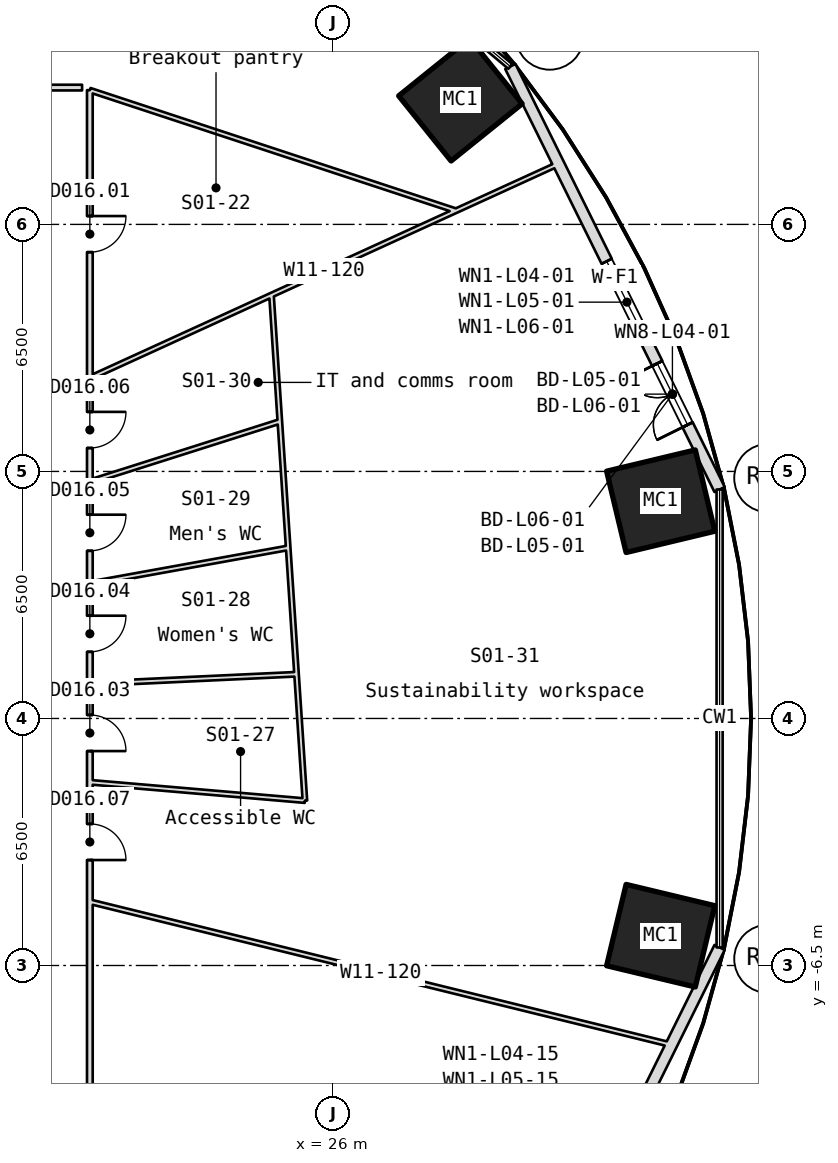
"""IFC4 building model, lengths in metres.
Left out: names, types, materials, properties, quantities, classifications, styles, units other than length and angle.
Written with IfcOpenShell. Run it as: python <this file> out.ifc"""

import sys

from ifc_helpers import new_model, si_unit, direction, frame, frame_2d, origin, origin_2d, place, context, subcontext, project, spatial, rectangle, hollow_rectangle, extrude, element, fill, save


model = new_model("IFC4")
c1 = context("Model", 3, precision=1e-05, world=origin(), true_north=direction((0.0, 1.0)))
c2 = subcontext(c1, "Body", "Model", "MODEL_VIEW")
j1 = project(units=[si_unit("LENGTHUNIT", "METRE"), si_unit("PLANEANGLEUNIT", "RADIAN")], contexts=[c1])
p1 = place(None, origin())
s1 = spatial("IfcSite", under=j1, at=p1, CompositionType="ELEMENT")
p2 = place(p1, origin())
s2 = spatial("IfcBuilding", under=s1, at=p2, CompositionType="ELEMENT")
p3 = place(p2, frame((0.0, 0.0, 33.0)))
s3 = spatial("IfcBuildingStorey", under=s2, at=p3, CompositionType="ELEMENT", Elevation=33.0)
for number, where, z_axis, x_axis in (
    (1, (34.622, 5.716, -0.18), (0.0, 0.0, 1.0), (0.233, -0.972, 0.0)),
    (2, (29.351, 16.278, -0.18), (0.0, 0.0, 1.0), (0.627, -0.779, 0.0)),
    (3, (34.622, -5.716, -0.18), (0.0, 0.0, 1.0), (-0.233, -0.972, 0.0)),
):
    element("IfcColumn", number, at=place(p3, frame(where, z_axis=z_axis, x_axis=x_axis)), inside=s3, PredefinedType="COLUMN", context=c2, shape_type="SweptSolid", body=[
        extrude(hollow_rectangle(XDim=2.2, YDim=2.4, WallThickness=0.09, at=origin_2d()), origin(), (0.0, 0.0, 1.0), 4.15),
    ])
p4 = place(p3, frame((36.171, 6.024, 0.0), z_axis=(0.0, 0.0, 1.0), x_axis=(-0.443411588907, 0.896318114747, 0.0)))
e4 = element("IfcWall", 4, at=p4, inside=s3, PredefinedType="SOLIDWALL", context=c2, shape_type="SweptSolid", body=[
    extrude(rectangle(XDim=12.419, YDim=0.3, at=frame_2d((6.209, 0.0))), origin(), (0.0, 0.0, 1.0), 3.97),
])
p5 = place(p4, frame((1.9, 0.0, 0.0)))
e5 = element("IfcOpeningElement", 5, at=p5, cuts=e4, PredefinedType="OPENING", context=c2, shape_type="SweptSolid", body=[
    extrude(rectangle(XDim=1.8, YDim=2.4, at=frame_2d((0.9, 1.2))), frame((0.0, 0.16, 0.0), z_axis=(0.0, -1.0, 0.0), x_axis=(1.0, 0.0, 0.0)), (0.0, 0.0, 1.0), 0.32),
])
p6 = place(p4, frame((4.3, 0.0, 0.9)))
e6 = element("IfcOpeningElement", 6, at=p6, cuts=e4, PredefinedType="OPENING", context=c2, shape_type="SweptSolid", body=[
    extrude(rectangle(XDim=2.4, YDim=1.5, at=frame_2d((1.2, 0.75))), frame((0.0, 0.16, 0.0), z_axis=(0.0, -1.0, 0.0), x_axis=(1.0, 0.0, 0.0)), (0.0, 0.0, 1.0), 0.32),
])
p7 = place(p3, frame((30.665, -17.156, 0.0), z_axis=(0.0, 0.0, 1.0), x_axis=(0.443411588907, 0.896318114747, 0.0)))
e7 = element("IfcWall", 7, at=p7, inside=s3, PredefinedType="SOLIDWALL", context=c2, shape_type="SweptSolid", body=[
    extrude(rectangle(XDim=12.419, YDim=0.3, at=frame_2d((6.209, 0.0))), origin(), (0.0, 0.0, 1.0), 3.97),
])
p8 = place(p7, frame((1.9, 0.0, 0.0)))
e8 = element("IfcOpeningElement", 8, at=p8, cuts=e7, PredefinedType="OPENING", context=c2, shape_type="SweptSolid", body=[
    extrude(rectangle(XDim=1.8, YDim=2.4, at=frame_2d((0.9, 1.2))), frame((0.0, 0.16, 0.0), z_axis=(0.0, -1.0, 0.0), x_axis=(1.0, 0.0, 0.0)), (0.0, 0.0, 1.0), 0.32),
])
p9 = place(p7, frame((4.3, 0.0, 0.9)))
e9 = element("IfcOpeningElement", 9, at=p9, cuts=e7, PredefinedType="OPENING", context=c2, shape_type="SweptSolid", body=[
    extrude(rectangle(XDim=2.4, YDim=1.5, at=frame_2d((1.2, 0.75))), frame((0.0, 0.16, 0.0), z_axis=(0.0, -1.0, 0.0), x_axis=(1.0, 0.0, 0.0)), (0.0, 0.0, 1.0), 0.32),
])
p10 = place(p3, frame((-19.6, 16.6, 0.0), z_axis=(0.0, 0.0, 1.0), x_axis=(1.0, 0.0, 0.0)))
e10 = element("IfcWall", 10, at=p10, inside=s3, PredefinedType="PARTITIONING", context=c2, shape_type="SweptSolid", body=[
    extrude(rectangle(XDim=38.996, YDim=0.15, at=frame_2d((19.498, 0.0))), origin(), (0.0, 0.0, 1.0), 3.97),
])
p11 = place(p10, frame((19.857, 0.0, 0.0)))
e11 = element("IfcOpeningElement", 11, at=p11, cuts=e10, PredefinedType="OPENING", context=c2, shape_type="SweptSolid", body=[
    extrude(rectangle(XDim=1.8, YDim=2.1, at=frame_2d((0.9, 1.05))), frame((0.0, 0.085, 0.0), z_axis=(0.0, -1.0, 0.0), x_axis=(1.0, 0.0, 0.0)), (0.0, 0.0, 1.0), 0.17),
])
p12 = place(p10, frame((5.757, 0.0, 0.0)))
e12 = element("IfcOpeningElement", 12, at=p12, cuts=e10, PredefinedType="OPENING", context=c2, shape_type="SweptSolid", body=[
    extrude(rectangle(XDim=1.8, YDim=2.1, at=frame_2d((0.9, 1.05))), frame((0.0, 0.085, 0.0), z_axis=(0.0, -1.0, 0.0), x_axis=(1.0, 0.0, 0.0)), (0.0, 0.0, 1.0), 0.17),
])
p13 = place(p3, frame((19.6, -4.822, 0.0), z_axis=(0.0, 0.0, 1.0), x_axis=(0.971041534545, -0.238910732678, 0.0)))
e13 = element("IfcWall", 13, at=p13, inside=s3, PredefinedType="PARTITIONING", context=c2, shape_type="SweptSolid", body=[
    extrude(rectangle(XDim=15.76, YDim=0.12, at=frame_2d((7.88, 0.0))), origin(), (0.0, 0.0, 1.0), 3.97),
])
p14 = place(p3, frame((19.6, 8.957, 0.0), z_axis=(0.0, 0.0, 1.0), x_axis=(0.909522905178, 0.415653804213, 0.0)))
e14 = element("IfcWall", 14, at=p14, inside=s3, PredefinedType="PARTITIONING", context=c2, shape_type="SweptSolid", body=[
    extrude(rectangle(XDim=13.559, YDim=0.12, at=frame_2d((6.78, 0.0))), origin(), (0.0, 0.0, 1.0), 3.97),
])
p15 = place(p3, frame((19.6, 16.533, 0.0), z_axis=(0.0, 0.0, 1.0), x_axis=(0.0, -1.0, 0.0)))
e15 = element("IfcWall", 15, at=p15, inside=s3, PredefinedType="PARTITIONING", context=c2, shape_type="SweptSolid", body=[
    extrude(rectangle(XDim=33.133, YDim=0.15, at=frame_2d((16.566, 0.0))), origin(), (0.0, 0.0, 1.0), 3.97),
])
p16 = place(p15, frame((3.313, 0.0, 0.0)))
e16 = element("IfcOpeningElement", 16, at=p16, cuts=e15, PredefinedType="OPENING", context=c2, shape_type="SweptSolid", body=[
    extrude(rectangle(XDim=0.95, YDim=2.1, at=frame_2d((0.475, 1.05))), frame((0.0, 0.085, 0.0), z_axis=(0.0, -1.0, 0.0), x_axis=(1.0, 0.0, 0.0)), (0.0, 0.0, 1.0), 0.17),
])
p17 = place(p15, frame((16.441, 0.0, 0.0)))
e17 = element("IfcOpeningElement", 17, at=p17, cuts=e15, PredefinedType="OPENING", context=c2, shape_type="SweptSolid", body=[
    extrude(rectangle(XDim=0.95, YDim=2.1, at=frame_2d((0.475, 1.05))), frame((0.0, 0.085, 0.0), z_axis=(0.0, -1.0, 0.0), x_axis=(1.0, 0.0, 0.0)), (0.0, 0.0, 1.0), 0.17),
])
p18 = place(p15, frame((13.829, 0.0, 0.0)))
e18 = element("IfcOpeningElement", 18, at=p18, cuts=e15, PredefinedType="OPENING", context=c2, shape_type="SweptSolid", body=[
    extrude(rectangle(XDim=0.95, YDim=2.1, at=frame_2d((0.475, 1.05))), frame((0.0, 0.085, 0.0), z_axis=(0.0, -1.0, 0.0), x_axis=(1.0, 0.0, 0.0)), (0.0, 0.0, 1.0), 0.17),
])
p19 = place(p15, frame((11.171, 0.0, 0.0)))
e19 = element("IfcOpeningElement", 19, at=p19, cuts=e15, PredefinedType="OPENING", context=c2, shape_type="SweptSolid", body=[
    extrude(rectangle(XDim=0.95, YDim=2.1, at=frame_2d((0.475, 1.05))), frame((0.0, 0.085, 0.0), z_axis=(0.0, -1.0, 0.0), x_axis=(1.0, 0.0, 0.0)), (0.0, 0.0, 1.0), 0.17),
])
p20 = place(p15, frame((8.466, 0.0, 0.0)))
e20 = element("IfcOpeningElement", 20, at=p20, cuts=e15, PredefinedType="OPENING", context=c2, shape_type="SweptSolid", body=[
    extrude(rectangle(XDim=0.95, YDim=2.1, at=frame_2d((0.475, 1.05))), frame((0.0, 0.085, 0.0), z_axis=(0.0, -1.0, 0.0), x_axis=(1.0, 0.0, 0.0)), (0.0, 0.0, 1.0), 0.17),
])
p21 = place(p15, frame((19.308, 0.0, 0.0)))
e21 = element("IfcOpeningElement", 21, at=p21, cuts=e15, PredefinedType="OPENING", context=c2, shape_type="SweptSolid", body=[
    extrude(rectangle(XDim=0.95, YDim=2.1, at=frame_2d((0.475, 1.05))), frame((0.0, 0.085, 0.0), z_axis=(0.0, -1.0, 0.0), x_axis=(1.0, 0.0, 0.0)), (0.0, 0.0, 1.0), 0.17),
])
p22 = place(p3, frame((24.6, 7.815, 0.0), z_axis=(0.0, 0.0, 1.0), x_axis=(-0.95305649374, -0.302792535808, 0.0)))
e22 = element("IfcWall", 22, at=p22, inside=s3, PredefinedType="PARTITIONING", context=c2, shape_type="SweptSolid", body=[
    extrude(rectangle(XDim=5.246, YDim=0.12, at=frame_2d((2.623, 0.0))), origin(), (0.0, 0.0, 1.0), 3.97),
])
p23 = place(p3, frame((24.819, 4.49, 0.0), z_axis=(0.0, 0.0, 1.0), x_axis=(-0.984022736167, -0.178042845144, 0.0)))
e23 = element("IfcWall", 23, at=p23, inside=s3, PredefinedType="PARTITIONING", context=c2, shape_type="SweptSolid", body=[
    extrude(rectangle(XDim=5.304, YDim=0.12, at=frame_2d((2.652, 0.0))), origin(), (0.0, 0.0, 1.0), 3.97),
])
p24 = place(p3, frame((25.039, 1.164, 0.0), z_axis=(0.0, 0.0, 1.0), x_axis=(-0.998922552869, -0.046408332984, 0.0)))
e24 = element("IfcWall", 24, at=p24, inside=s3, PredefinedType="PARTITIONING", context=c2, shape_type="SweptSolid", body=[
    extrude(rectangle(XDim=5.445, YDim=0.12, at=frame_2d((2.722, 0.0))), origin(), (0.0, 0.0, 1.0), 3.97),
])
p25 = place(p3, frame((25.259, -2.162, 0.0), z_axis=(0.0, 0.0, 1.0), x_axis=(-0.065941683727, 0.997823478551, 0.0)))
e25 = element("IfcWall", 25, at=p25, inside=s3, PredefinedType="PARTITIONING", context=c2, shape_type="SweptSolid", body=[
    extrude(rectangle(XDim=13.332, YDim=0.12, at=frame_2d((6.666, 0.0))), origin(), (0.0, 0.0, 1.0), 3.97),
])
p26 = place(p3, frame((25.259, -2.162, 0.0), z_axis=(0.0, 0.0, 1.0), x_axis=(-0.996356466097, 0.08528653157, 0.0)))
e26 = element("IfcWall", 26, at=p26, inside=s3, PredefinedType="PARTITIONING", context=c2, shape_type="SweptSolid", body=[
    extrude(rectangle(XDim=5.679, YDim=0.12, at=frame_2d((2.84, 0.0))), origin(), (0.0, 0.0, 1.0), 3.97),
])
p27 = place(p3, frame((29.233, 13.359, 0.0), z_axis=(0.0, 0.0, 1.0), x_axis=(-0.949784766096, 0.312903975834, 0.0)))
e27 = element("IfcWall", 27, at=p27, inside=s3, PredefinedType="PARTITIONING", context=c2, shape_type="SweptSolid", body=[
    extrude(rectangle(XDim=10.142, YDim=0.12, at=frame_2d((5.071, 0.0))), origin(), (0.0, 0.0, 1.0), 3.97),
])
p28 = place(p5, origin())
e28 = element("IfcWindow", 28, at=p28, inside=s3, PartitioningType="SINGLE_PANEL", PredefinedType="WINDOW", context=c2, shape_type="SweptSolid", body=[
    extrude(rectangle(XDim=1.8, YDim=2.4, at=frame_2d((0.9, 1.2))), frame((0.0, 0.03, 0.0), z_axis=(0.0, -1.0, 0.0), x_axis=(1.0, 0.0, 0.0)), (0.0, 0.0, 1.0), 0.06),
])
fill(e5, e28)
p29 = place(p6, origin())
e29 = element("IfcWindow", 29, at=p29, inside=s3, PartitioningType="SINGLE_PANEL", PredefinedType="WINDOW", context=c2, shape_type="SweptSolid", body=[
    extrude(rectangle(XDim=2.4, YDim=1.5, at=frame_2d((1.2, 0.75))), frame((0.0, 0.03, 0.0), z_axis=(0.0, -1.0, 0.0), x_axis=(1.0, 0.0, 0.0)), (0.0, 0.0, 1.0), 0.06),
])
fill(e6, e29)
p30 = place(p16, origin())
e30 = element("IfcDoor", 30, at=p30, inside=s3, OperationType="SINGLE_SWING_RIGHT", PredefinedType="DOOR", context=c2, shape_type="SweptSolid", body=[
    extrude(rectangle(XDim=0.95, YDim=2.1, at=frame_2d((0.475, 1.05))), frame((0.0, 0.025, 0.0), z_axis=(0.0, -1.0, 0.0), x_axis=(1.0, 0.0, 0.0)), (0.0, 0.0, 1.0), 0.05),
])
fill(e16, e30)
p31 = place(p17, origin())
e31 = element("IfcDoor", 31, at=p31, inside=s3, OperationType="SINGLE_SWING_RIGHT", PredefinedType="DOOR", context=c2, shape_type="SweptSolid", body=[
    extrude(rectangle(XDim=0.95, YDim=2.1, at=frame_2d((0.475, 1.05))), frame((0.0, 0.025, 0.0), z_axis=(0.0, -1.0, 0.0), x_axis=(1.0, 0.0, 0.0)), (0.0, 0.0, 1.0), 0.05),
])
fill(e17, e31)
p32 = place(p18, origin())
e32 = element("IfcDoor", 32, at=p32, inside=s3, OperationType="SINGLE_SWING_RIGHT", PredefinedType="DOOR", context=c2, shape_type="SweptSolid", body=[
    extrude(rectangle(XDim=0.95, YDim=2.1, at=frame_2d((0.475, 1.05))), frame((0.0, 0.025, 0.0), z_axis=(0.0, -1.0, 0.0), x_axis=(1.0, 0.0, 0.0)), (0.0, 0.0, 1.0), 0.05),
])
fill(e18, e32)
p33 = place(p19, origin())
e33 = element("IfcDoor", 33, at=p33, inside=s3, OperationType="SINGLE_SWING_RIGHT", PredefinedType="DOOR", context=c2, shape_type="SweptSolid", body=[
    extrude(rectangle(XDim=0.95, YDim=2.1, at=frame_2d((0.475, 1.05))), frame((0.0, 0.025, 0.0), z_axis=(0.0, -1.0, 0.0), x_axis=(1.0, 0.0, 0.0)), (0.0, 0.0, 1.0), 0.05),
])
fill(e19, e33)
p34 = place(p20, origin())
e34 = element("IfcDoor", 34, at=p34, inside=s3, OperationType="SINGLE_SWING_RIGHT", PredefinedType="DOOR", context=c2, shape_type="SweptSolid", body=[
    extrude(rectangle(XDim=0.95, YDim=2.1, at=frame_2d((0.475, 1.05))), frame((0.0, 0.025, 0.0), z_axis=(0.0, -1.0, 0.0), x_axis=(1.0, 0.0, 0.0)), (0.0, 0.0, 1.0), 0.05),
])
fill(e20, e34)
p35 = place(p21, origin())
e35 = element("IfcDoor", 35, at=p35, inside=s3, OperationType="SINGLE_SWING_RIGHT", PredefinedType="DOOR", context=c2, shape_type="SweptSolid", body=[
    extrude(rectangle(XDim=0.95, YDim=2.1, at=frame_2d((0.475, 1.05))), frame((0.0, 0.025, 0.0), z_axis=(0.0, -1.0, 0.0), x_axis=(1.0, 0.0, 0.0)), (0.0, 0.0, 1.0), 0.05),
])
fill(e21, e35)
save(model, sys.argv[1])
